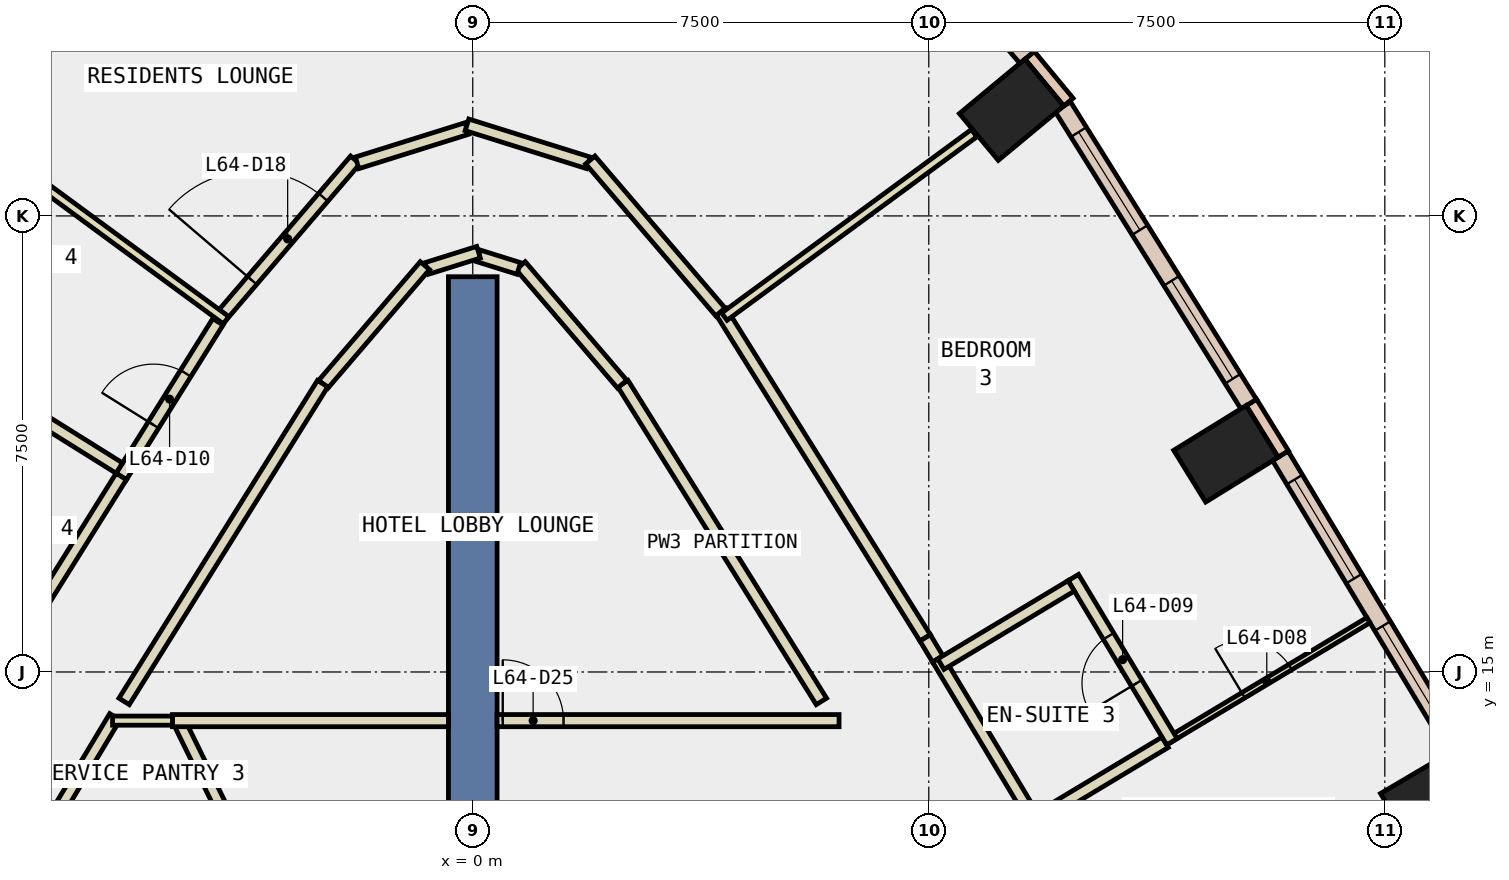
"""IFC4 building model, lengths in metres.
Left out: names, types, materials, properties, quantities, classifications, styles, units other than length and angle.
Written with IfcOpenShell. Run it as: python <this file> out.ifc"""

import sys

from ifc_helpers import new_model, si_unit, direction, frame, frame_2d, origin, origin_2d, place, context, subcontext, project, spatial, rectangle, extrude, element, fill, save


model = new_model("IFC4")
c1 = context("Model", 3, precision=1e-05, world=origin(), true_north=direction((0.0, 1.0)))
c2 = subcontext(c1, "Body", "Model", "MODEL_VIEW")
j1 = project(units=[si_unit("LENGTHUNIT", "METRE"), si_unit("PLANEANGLEUNIT", "RADIAN")], contexts=[c1])
p1 = place(None, origin())
s1 = spatial("IfcSite", under=j1, at=p1, CompositionType="ELEMENT")
p2 = place(p1, origin())
s2 = spatial("IfcBuilding", under=s1, at=p2, CompositionType="ELEMENT")
p3 = place(p2, frame((0.0, 0.0, 277.4)))
s3 = spatial("IfcBuildingStorey", under=s2, at=p3, CompositionType="ELEMENT", Elevation=277.4)
for number, where, z_axis, x_axis in (
    (1, (15.787, 12.927, -0.34), (0.0, 0.0, 1.0), (-0.509, 0.861, 0.0)),
    (2, (12.387, 18.588, -0.34), (0.0, 0.0, 1.0), (-0.526, 0.851, 0.0)),
    (3, (8.862, 24.246, -0.34), (0.0, 0.0, 1.0), (-0.639, 0.769, 0.0)),
):
    element("IfcColumn", number, at=place(p3, frame(where, z_axis=z_axis, x_axis=x_axis)), inside=s3, PredefinedType="COLUMN", context=c2, shape_type="SweptSolid", body=[
        extrude(rectangle(XDim=1.0, YDim=1.4, at=origin_2d()), origin(), (0.0, 0.0, 1.0), 3.34),
    ])
p4 = place(p3, frame((0.0, 12.5, -0.34), z_axis=(0.0, 0.0, 1.0), x_axis=(0.0, 1.0, 0.0)))
e4 = element("IfcWall", 4, at=p4, inside=s3, PredefinedType="SHEAR", context=c2, shape_type="SweptSolid", body=[
    extrude(rectangle(XDim=9.0, YDim=0.8, at=frame_2d((4.5, 0.0))), origin(), (0.0, 0.0, 1.0), 3.34),
])
p5 = place(p3, frame((13.331, 18.583, 0.0), z_axis=(0.0, 0.0, 1.0), x_axis=(-0.525825307325, 0.850592585306, 0.0)))
e5 = element("IfcWall", 5, at=p5, inside=s3, PredefinedType="STANDARD", context=c2, shape_type="SweptSolid", body=[
    extrude(rectangle(XDim=1.0, YDim=0.2, at=frame_2d((0.5, 0.0))), origin(), (0.0, 0.0, 1.0), 3.0),
])
p6 = place(p3, frame((9.796, 24.372, 0.0), z_axis=(0.0, 0.0, 1.0), x_axis=(-0.637972365578, 0.770059257953, 0.0)))
e6 = element("IfcWall", 6, at=p6, inside=s3, PredefinedType="STANDARD", context=c2, shape_type="SweptSolid", body=[
    extrude(rectangle(XDim=1.0, YDim=0.2, at=frame_2d((0.5, 0.0))), origin(), (0.0, 0.0, 1.0), 3.0),
])
p7 = place(p3, frame((16.176, 13.737, 0.0), z_axis=(0.0, 0.0, 1.0), x_axis=(-0.515006791362, 0.857186096977, 0.0)))
e7 = element("IfcWall", 7, at=p7, inside=s3, PredefinedType="STANDARD", context=c2, shape_type="SweptSolid", body=[
    extrude(rectangle(XDim=5.619, YDim=0.3, at=frame_2d((2.81, 0.0))), origin(), (0.0, 0.0, 1.0), 3.0),
])
p8 = place(p7, frame((0.455, 0.0, 0.9)))
e8 = element("IfcOpeningElement", 8, at=p8, cuts=e7, PredefinedType="OPENING", context=c2, shape_type="SweptSolid", body=[
    extrude(rectangle(XDim=1.9, YDim=2.0, at=frame_2d((0.95, 1.0))), frame((0.0, 0.16, 0.0), z_axis=(0.0, -1.0, 0.0), x_axis=(1.0, 0.0, 0.0)), (0.0, 0.0, 1.0), 0.32),
])
p9 = place(p7, frame((3.265, 0.0, 0.9)))
e9 = element("IfcOpeningElement", 9, at=p9, cuts=e7, PredefinedType="OPENING", context=c2, shape_type="SweptSolid", body=[
    extrude(rectangle(XDim=1.9, YDim=2.0, at=frame_2d((0.95, 1.0))), frame((0.0, 0.16, 0.0), z_axis=(0.0, -1.0, 0.0), x_axis=(1.0, 0.0, 0.0)), (0.0, 0.0, 1.0), 0.32),
])
p10 = place(p3, frame((12.761, 19.405, 0.0), z_axis=(0.0, 0.0, 1.0), x_axis=(-0.529915244244, 0.848050608111, 0.0)))
e10 = element("IfcWall", 10, at=p10, inside=s3, PredefinedType="STANDARD", context=c2, shape_type="SweptSolid", body=[
    extrude(rectangle(XDim=5.769, YDim=0.3, at=frame_2d((2.884, 0.0))), origin(), (0.0, 0.0, 1.0), 3.0),
])
p11 = place(p10, frame((0.492, 0.0, 0.9)))
e11 = element("IfcOpeningElement", 11, at=p11, cuts=e10, PredefinedType="OPENING", context=c2, shape_type="SweptSolid", body=[
    extrude(rectangle(XDim=1.9, YDim=2.0, at=frame_2d((0.95, 1.0))), frame((0.0, 0.16, 0.0), z_axis=(0.0, -1.0, 0.0), x_axis=(1.0, 0.0, 0.0)), (0.0, 0.0, 1.0), 0.32),
])
p12 = place(p10, frame((3.376, 0.0, 0.9)))
e12 = element("IfcOpeningElement", 12, at=p12, cuts=e10, PredefinedType="OPENING", context=c2, shape_type="SweptSolid", body=[
    extrude(rectangle(XDim=1.9, YDim=2.0, at=frame_2d((0.95, 1.0))), frame((0.0, 0.16, 0.0), z_axis=(0.0, -1.0, 0.0), x_axis=(1.0, 0.0, 0.0)), (0.0, 0.0, 1.0), 0.32),
])
p13 = place(p3, frame((9.114, 25.104, 0.0), z_axis=(0.0, 0.0, 1.0), x_axis=(-0.650534879197, 0.759476379454, 0.0)))
e13 = element("IfcWall", 13, at=p13, inside=s3, PredefinedType="STANDARD", context=c2, shape_type="SweptSolid", body=[
    extrude(rectangle(XDim=4.625, YDim=0.3, at=frame_2d((2.313, 0.0))), origin(), (0.0, 0.0, 1.0), 3.0),
])
p14 = place(p13, frame((1.613, 0.0, 0.9)))
e14 = element("IfcOpeningElement", 14, at=p14, cuts=e13, PredefinedType="OPENING", context=c2, shape_type="SweptSolid", body=[
    extrude(rectangle(XDim=1.4, YDim=2.0, at=frame_2d((0.7, 1.0))), frame((0.0, 0.16, 0.0), z_axis=(0.0, -1.0, 0.0), x_axis=(1.0, 0.0, 0.0)), (0.0, 0.0, 1.0), 0.32),
])
p15 = place(p3, frame((-6.105, 28.617, 0.0), z_axis=(0.0, 0.0, 1.0), x_axis=(-0.650534879197, -0.759476379454, 0.0)))
e15 = element("IfcWall", 15, at=p15, inside=s3, PredefinedType="STANDARD", context=c2, shape_type="SweptSolid", body=[
    extrude(rectangle(XDim=4.625, YDim=0.3, at=frame_2d((2.313, 0.0))), origin(), (0.0, 0.0, 1.0), 3.0),
])
p16 = place(p15, frame((1.613, 0.0, 0.9)))
e16 = element("IfcOpeningElement", 16, at=p16, cuts=e15, PredefinedType="OPENING", context=c2, shape_type="SweptSolid", body=[
    extrude(rectangle(XDim=1.4, YDim=2.0, at=frame_2d((0.7, 1.0))), frame((0.0, 0.16, 0.0), z_axis=(0.0, -1.0, 0.0), x_axis=(1.0, 0.0, 0.0)), (0.0, 0.0, 1.0), 0.32),
])
p17 = place(p3, frame((-4.005, 12.5, 0.0), z_axis=(0.0, 0.0, 1.0), x_axis=(-0.440355460167, 0.89782351757, 0.0)))
e17 = element("IfcWall", 17, at=p17, inside=s3, PredefinedType="PARTITIONING", context=c2, shape_type="SweptSolid", body=[
    extrude(rectangle(XDim=1.869, YDim=0.2, at=frame_2d((0.935, 0.0))), origin(), (0.0, 0.0, 1.0), 3.0),
])
p18 = place(p3, frame((-5.885, 14.264, 0.0), z_axis=(0.0, 0.0, 1.0), x_axis=(-0.514971458129, -0.857207324579, 0.0)))
e18 = element("IfcWall", 18, at=p18, inside=s3, PredefinedType="PARTITIONING", context=c2, shape_type="SweptSolid", body=[
    extrude(rectangle(XDim=4.83, YDim=0.2, at=frame_2d((2.415, 0.0))), origin(), (0.0, 0.0, 1.0), 3.0),
])
p19 = place(p18, frame((1.915, 0.0, 0.0)))
e19 = element("IfcOpeningElement", 19, at=p19, cuts=e18, PredefinedType="OPENING", context=c2, shape_type="SweptSolid", body=[
    extrude(rectangle(XDim=1.0, YDim=2.1, at=frame_2d((0.5, 1.05))), frame((0.0, 0.11, 0.0), z_axis=(0.0, -1.0, 0.0), x_axis=(1.0, 0.0, 0.0)), (0.0, 0.0, 1.0), 0.22),
])
p20 = place(p3, frame((-4.939, 14.2, 0.0), z_axis=(0.0, 0.0, 1.0), x_axis=(1.0, 0.0, 0.0)))
e20 = element("IfcWall", 20, at=p20, inside=s3, PredefinedType="PARTITIONING", context=c2, shape_type="SweptSolid", body=[
    extrude(rectangle(XDim=4.539, YDim=0.2, at=frame_2d((2.27, 0.0))), origin(), (0.0, 0.0, 1.0), 3.0),
])
p21 = place(p3, frame((5.734, 14.516, 0.0), z_axis=(0.0, 0.0, 1.0), x_axis=(-0.529852912827, 0.848089553508, 0.0)))
e21 = element("IfcWall", 21, at=p21, inside=s3, PredefinedType="PARTITIONING", context=c2, shape_type="SweptSolid", body=[
    extrude(rectangle(XDim=6.162, YDim=0.2, at=frame_2d((3.081, 0.0))), origin(), (0.0, 0.0, 1.0), 3.0),
])
p22 = place(p3, frame((2.457, 19.733, 0.0), z_axis=(0.0, 0.0, 1.0), x_axis=(-0.650650354416, 0.759377453114, 0.0)))
e22 = element("IfcWall", 22, at=p22, inside=s3, PredefinedType="PARTITIONING", context=c2, shape_type="SweptSolid", body=[
    extrude(rectangle(XDim=2.567, YDim=0.2, at=frame_2d((1.283, 0.0))), origin(), (0.0, 0.0, 1.0), 3.0),
])
p23 = place(p3, frame((0.757, 21.636, 0.0), z_axis=(0.0, 0.0, 1.0), x_axis=(-0.954429868001, 0.298435297959, 0.0)))
e23 = element("IfcWall", 23, at=p23, inside=s3, PredefinedType="PARTITIONING", context=c2, shape_type="SweptSolid", body=[
    extrude(rectangle(XDim=0.694, YDim=0.2, at=frame_2d((0.347, 0.0))), origin(), (0.0, 0.0, 1.0), 3.0),
])
p24 = place(p3, frame((0.095, 21.903, 0.0), z_axis=(0.0, 0.0, 1.0), x_axis=(-0.954216896292, -0.299115554311, 0.0)))
e24 = element("IfcWall", 24, at=p24, inside=s3, PredefinedType="PARTITIONING", context=c2, shape_type="SweptSolid", body=[
    extrude(rectangle(XDim=0.893, YDim=0.2, at=frame_2d((0.446, 0.0))), origin(), (0.0, 0.0, 1.0), 3.0),
])
p25 = place(p3, frame((-0.787, 21.682, 0.0), z_axis=(0.0, 0.0, 1.0), x_axis=(-0.650650354416, -0.759377453114, 0.0)))
e25 = element("IfcWall", 25, at=p25, inside=s3, PredefinedType="PARTITIONING", context=c2, shape_type="SweptSolid", body=[
    extrude(rectangle(XDim=2.567, YDim=0.2, at=frame_2d((1.283, 0.0))), origin(), (0.0, 0.0, 1.0), 3.0),
])
p26 = place(p3, frame((-2.469, 19.742, 0.0), z_axis=(0.0, 0.0, 1.0), x_axis=(-0.529852912827, -0.848089553508, 0.0)))
e26 = element("IfcWall", 26, at=p26, inside=s3, PredefinedType="PARTITIONING", context=c2, shape_type="SweptSolid", body=[
    extrude(rectangle(XDim=6.162, YDim=0.2, at=frame_2d((3.081, 0.0))), origin(), (0.0, 0.0, 1.0), 3.0),
])
p27 = place(p3, frame((4.085, 20.929, 0.0), z_axis=(0.0, 0.0, 1.0), x_axis=(0.530002406791, -0.847996137253, 0.0)))
e27 = element("IfcWall", 27, at=p27, inside=s3, PredefinedType="PARTITIONING", context=c2, shape_type="SweptSolid", body=[
    extrude(rectangle(XDim=6.33, YDim=0.2, at=frame_2d((3.165, 0.0))), origin(), (0.0, 0.0, 1.0), 3.0),
])
p28 = place(p3, frame((7.44, 15.561, 0.0), z_axis=(0.0, 0.0, 1.0), x_axis=(0.514229456049, -0.857652649114, 0.0)))
e28 = element("IfcWall", 28, at=p28, inside=s3, PredefinedType="PARTITIONING", context=c2, shape_type="SweptSolid", body=[
    extrude(rectangle(XDim=0.405, YDim=0.2, at=frame_2d((0.202, 0.0))), origin(), (0.0, 0.0, 1.0), 3.0),
])
p29 = place(p3, frame((7.648, 15.214, 0.0), z_axis=(0.0, 0.0, 1.0), x_axis=(0.515118014871, -0.857119262854, 0.0)))
e29 = element("IfcWall", 29, at=p29, inside=s3, PredefinedType="PARTITIONING", context=c2, shape_type="SweptSolid", body=[
    extrude(rectangle(XDim=3.0, YDim=0.2, at=frame_2d((1.5, 0.0))), origin(), (0.0, 0.0, 1.0), 3.0),
])
p30 = place(p3, frame((-4.155, 20.825, 0.0), z_axis=(0.0, 0.0, 1.0), x_axis=(0.650396970678, 0.75959448427, 0.0)))
e30 = element("IfcWall", 30, at=p30, inside=s3, PredefinedType="PARTITIONING", context=c2, shape_type="SweptSolid", body=[
    extrude(rectangle(XDim=3.416, YDim=0.2, at=frame_2d((1.708, 0.0))), origin(), (0.0, 0.0, 1.0), 3.0),
])
p31 = place(p30, frame((0.808, 0.0, 0.0)))
e31 = element("IfcOpeningElement", 31, at=p31, cuts=e30, PredefinedType="OPENING", context=c2, shape_type="SweptSolid", body=[
    extrude(rectangle(XDim=1.8, YDim=2.1, at=frame_2d((0.9, 1.05))), frame((0.0, 0.11, 0.0), z_axis=(0.0, -1.0, 0.0), x_axis=(1.0, 0.0, 0.0)), (0.0, 0.0, 1.0), 0.22),
])
p32 = place(p3, frame((-1.902, 23.373, 0.0), z_axis=(0.0, 0.0, 1.0), x_axis=(0.954447851072, 0.298377779976, 0.0)))
e32 = element("IfcWall", 32, at=p32, inside=s3, PredefinedType="PARTITIONING", context=c2, shape_type="SweptSolid", body=[
    extrude(rectangle(XDim=1.893, YDim=0.2, at=frame_2d((0.947, 0.0))), origin(), (0.0, 0.0, 1.0), 3.0),
])
p33 = place(p3, frame((-0.095, 23.998, 0.0), z_axis=(0.0, 0.0, 1.0), x_axis=(0.954355336779, -0.298673552831, 0.0)))
e33 = element("IfcWall", 33, at=p33, inside=s3, PredefinedType="PARTITIONING", context=c2, shape_type="SweptSolid", body=[
    extrude(rectangle(XDim=2.093, YDim=0.2, at=frame_2d((1.046, 0.0))), origin(), (0.0, 0.0, 1.0), 3.0),
])
p34 = place(p3, frame((1.933, 23.42, 0.0), z_axis=(0.0, 0.0, 1.0), x_axis=(0.65027189398, -0.759701562391, 0.0)))
e34 = element("IfcWall", 34, at=p34, inside=s3, PredefinedType="PARTITIONING", context=c2, shape_type="SweptSolid", body=[
    extrude(rectangle(XDim=3.291, YDim=0.2, at=frame_2d((1.646, 0.0))), origin(), (0.0, 0.0, 1.0), 3.0),
])
p35 = place(p3, frame((-5.781, 18.215, 0.0), z_axis=(0.0, 0.0, 1.0), x_axis=(0.530028199927, 0.847980015851, 0.0)))
e35 = element("IfcWall", 35, at=p35, inside=s3, PredefinedType="PARTITIONING", context=c2, shape_type="SweptSolid", body=[
    extrude(rectangle(XDim=3.0, YDim=0.2, at=frame_2d((1.5, 0.0))), origin(), (0.0, 0.0, 1.0), 3.0),
])
p36 = place(p35, frame((1.0, 0.0, 0.0)))
e36 = element("IfcOpeningElement", 36, at=p36, cuts=e35, PredefinedType="OPENING", context=c2, shape_type="SweptSolid", body=[
    extrude(rectangle(XDim=1.0, YDim=2.1, at=frame_2d((0.5, 1.05))), frame((0.0, 0.11, 0.0), z_axis=(0.0, -1.0, 0.0), x_axis=(1.0, 0.0, 0.0)), (0.0, 0.0, 1.0), 0.22),
])
p37 = place(p3, frame((-7.371, 15.671, 0.0), z_axis=(0.0, 0.0, 1.0), x_axis=(0.529991625428, 0.84800287557, 0.0)))
e37 = element("IfcWall", 37, at=p37, inside=s3, PredefinedType="PARTITIONING", context=c2, shape_type="SweptSolid", body=[
    extrude(rectangle(XDim=3.0, YDim=0.2, at=frame_2d((1.5, 0.0))), origin(), (0.0, 0.0, 1.0), 3.0),
])
p38 = place(p3, frame((-4.939, 14.2, 0.0), z_axis=(0.0, 0.0, 1.0), x_axis=(-1.0, 0.0, 0.0)))
e38 = element("IfcWall", 38, at=p38, inside=s3, PredefinedType="PARTITIONING", context=c2, shape_type="SweptSolid", body=[
    extrude(rectangle(XDim=0.985, YDim=0.15, at=frame_2d((0.493, 0.0))), origin(), (0.0, 0.0, 1.0), 3.0),
])
p39 = place(p3, frame((11.387, 13.844, 0.0), z_axis=(0.0, 0.0, 1.0), x_axis=(0.857238721908, 0.514919191389, 0.0)))
e39 = element("IfcWall", 39, at=p39, inside=s3, PredefinedType="PARTITIONING", context=c2, shape_type="SweptSolid", body=[
    extrude(rectangle(XDim=3.9, YDim=0.1, at=frame_2d((1.95, 0.0))), origin(), (0.0, 0.0, 1.0), 3.0),
])
p40 = place(p39, frame((1.5, 0.0, 0.0)))
e40 = element("IfcOpeningElement", 40, at=p40, cuts=e39, PredefinedType="OPENING", context=c2, shape_type="SweptSolid", body=[
    extrude(rectangle(XDim=0.9, YDim=2.1, at=frame_2d((0.45, 1.05))), frame((0.0, 0.06, 0.0), z_axis=(0.0, -1.0, 0.0), x_axis=(1.0, 0.0, 0.0)), (0.0, 0.0, 1.0), 0.12),
])
p41 = place(p3, frame((9.244, 12.557, 0.0), z_axis=(0.0, 0.0, 1.0), x_axis=(0.857268798444, 0.514869116586, 0.0)))
e41 = element("IfcWall", 41, at=p41, inside=s3, PredefinedType="PARTITIONING", context=c2, shape_type="SweptSolid", body=[
    extrude(rectangle(XDim=2.5, YDim=0.2, at=frame_2d((1.25, 0.0))), origin(), (0.0, 0.0, 1.0), 3.0),
])
p42 = place(p3, frame((11.499, 13.853, 0.0), z_axis=(0.0, 0.0, 1.0), x_axis=(-0.514985817066, 0.857198698214, 0.0)))
e42 = element("IfcWall", 42, at=p42, inside=s3, PredefinedType="PARTITIONING", context=c2, shape_type="SweptSolid", body=[
    extrude(rectangle(XDim=3.15, YDim=0.2, at=frame_2d((1.575, 0.0))), origin(), (0.0, 0.0, 1.0), 3.0),
])
p43 = place(p42, frame((1.125, 0.0, 0.0)))
e43 = element("IfcOpeningElement", 43, at=p43, cuts=e42, PredefinedType="OPENING", context=c2, shape_type="SweptSolid", body=[
    extrude(rectangle(XDim=0.9, YDim=2.1, at=frame_2d((0.45, 1.05))), frame((0.0, 0.11, 0.0), z_axis=(0.0, -1.0, 0.0), x_axis=(1.0, 0.0, 0.0)), (0.0, 0.0, 1.0), 0.22),
])
p44 = place(p3, frame((9.842, 16.416, 0.0), z_axis=(0.0, 0.0, 1.0), x_axis=(-0.857268798444, -0.514869116586, 0.0)))
e44 = element("IfcWall", 44, at=p44, inside=s3, PredefinedType="PARTITIONING", context=c2, shape_type="SweptSolid", body=[
    extrude(rectangle(XDim=2.5, YDim=0.2, at=frame_2d((1.25, 0.0))), origin(), (0.0, 0.0, 1.0), 3.0),
])
p45 = place(p3, frame((4.138, 20.844, 0.0), z_axis=(0.0, 0.0, 1.0), x_axis=(0.805989075855, 0.591930409426, 0.0)))
e45 = element("IfcWall", 45, at=p45, inside=s3, PredefinedType="PARTITIONING", context=c2, shape_type="SweptSolid", body=[
    extrude(rectangle(XDim=5.097, YDim=0.15, at=frame_2d((2.548, 0.0))), origin(), (0.0, 0.0, 1.0), 3.0),
])
p46 = place(p3, frame((-4.058, 20.785, 0.0), z_axis=(0.0, 0.0, 1.0), x_axis=(-0.805947688418, 0.591986759593, 0.0)))
e46 = element("IfcWall", 46, at=p46, inside=s3, PredefinedType="PARTITIONING", context=c2, shape_type="SweptSolid", body=[
    extrude(rectangle(XDim=5.196, YDim=0.15, at=frame_2d((2.598, 0.0))), origin(), (0.0, 0.0, 1.0), 3.0),
])
p47 = place(p3, frame((-5.813, 18.353, 0.0), z_axis=(0.0, 0.0, 1.0), x_axis=(-0.847969725239, 0.530044663287, 0.0)))
e47 = element("IfcWall", 47, at=p47, inside=s3, PredefinedType="PARTITIONING", context=c2, shape_type="SweptSolid", body=[
    extrude(rectangle(XDim=2.4, YDim=0.2, at=frame_2d((1.2, 0.0))), origin(), (0.0, 0.0, 1.0), 3.0),
])
p48 = place(p3, frame((0.4, 14.2, 0.0), z_axis=(0.0, 0.0, 1.0), x_axis=(1.0, 0.0, 0.0)))
e48 = element("IfcWall", 48, at=p48, inside=s3, PredefinedType="PARTITIONING", context=c2, shape_type="SweptSolid", body=[
    extrude(rectangle(XDim=5.624, YDim=0.2, at=frame_2d((2.812, 0.0))), origin(), (0.0, 0.0, 1.0), 3.0),
])
p49 = place(p48, frame((0.093, 0.0, 0.0)))
e49 = element("IfcOpeningElement", 49, at=p49, cuts=e48, PredefinedType="OPENING", context=c2, shape_type="SweptSolid", body=[
    extrude(rectangle(XDim=1.0, YDim=2.1, at=frame_2d((0.5, 1.05))), frame((0.0, 0.11, 0.0), z_axis=(0.0, -1.0, 0.0), x_axis=(1.0, 0.0, 0.0)), (0.0, 0.0, 1.0), 0.22),
])
p50 = place(p8, origin())
e50 = element("IfcWindow", 50, at=p50, inside=s3, PartitioningType="SINGLE_PANEL", PredefinedType="WINDOW", context=c2, shape_type="SweptSolid", body=[
    extrude(rectangle(XDim=1.9, YDim=2.0, at=frame_2d((0.95, 1.0))), frame((0.0, 0.03, 0.0), z_axis=(0.0, -1.0, 0.0), x_axis=(1.0, 0.0, 0.0)), (0.0, 0.0, 1.0), 0.06),
])
fill(e8, e50)
p51 = place(p9, origin())
e51 = element("IfcWindow", 51, at=p51, inside=s3, PartitioningType="SINGLE_PANEL", PredefinedType="WINDOW", context=c2, shape_type="SweptSolid", body=[
    extrude(rectangle(XDim=1.9, YDim=2.0, at=frame_2d((0.95, 1.0))), frame((0.0, 0.03, 0.0), z_axis=(0.0, -1.0, 0.0), x_axis=(1.0, 0.0, 0.0)), (0.0, 0.0, 1.0), 0.06),
])
fill(e9, e51)
p52 = place(p11, origin())
e52 = element("IfcWindow", 52, at=p52, inside=s3, PartitioningType="SINGLE_PANEL", PredefinedType="WINDOW", context=c2, shape_type="SweptSolid", body=[
    extrude(rectangle(XDim=1.9, YDim=2.0, at=frame_2d((0.95, 1.0))), frame((0.0, 0.03, 0.0), z_axis=(0.0, -1.0, 0.0), x_axis=(1.0, 0.0, 0.0)), (0.0, 0.0, 1.0), 0.06),
])
fill(e11, e52)
p53 = place(p12, origin())
e53 = element("IfcWindow", 53, at=p53, inside=s3, PartitioningType="SINGLE_PANEL", PredefinedType="WINDOW", context=c2, shape_type="SweptSolid", body=[
    extrude(rectangle(XDim=1.9, YDim=2.0, at=frame_2d((0.95, 1.0))), frame((0.0, 0.03, 0.0), z_axis=(0.0, -1.0, 0.0), x_axis=(1.0, 0.0, 0.0)), (0.0, 0.0, 1.0), 0.06),
])
fill(e12, e53)
p54 = place(p40, origin())
e54 = element("IfcDoor", 54, at=p54, inside=s3, OperationType="SINGLE_SWING_LEFT", PredefinedType="DOOR", context=c2, shape_type="SweptSolid", body=[
    extrude(rectangle(XDim=0.9, YDim=2.1, at=frame_2d((0.45, 1.05))), frame((0.0, 0.025, 0.0), z_axis=(0.0, -1.0, 0.0), x_axis=(1.0, 0.0, 0.0)), (0.0, 0.0, 1.0), 0.05),
])
fill(e40, e54)
p55 = place(p43, origin())
e55 = element("IfcDoor", 55, at=p55, inside=s3, OperationType="SINGLE_SWING_LEFT", PredefinedType="DOOR", context=c2, shape_type="SweptSolid", body=[
    extrude(rectangle(XDim=0.9, YDim=2.1, at=frame_2d((0.45, 1.05))), frame((0.0, 0.025, 0.0), z_axis=(0.0, -1.0, 0.0), x_axis=(1.0, 0.0, 0.0)), (0.0, 0.0, 1.0), 0.05),
])
fill(e43, e55)
p56 = place(p36, origin())
e56 = element("IfcDoor", 56, at=p56, inside=s3, OperationType="SINGLE_SWING_RIGHT", PredefinedType="DOOR", context=c2, shape_type="SweptSolid", body=[
    extrude(rectangle(XDim=1.0, YDim=2.1, at=frame_2d((0.5, 1.05))), frame((0.0, 0.025, 0.0), z_axis=(0.0, -1.0, 0.0), x_axis=(1.0, 0.0, 0.0)), (0.0, 0.0, 1.0), 0.05),
])
fill(e36, e56)
p57 = place(p31, origin())
e57 = element("IfcDoor", 57, at=p57, inside=s3, OperationType="DOUBLE_DOOR_SINGLE_SWING", PredefinedType="DOOR", context=c2, shape_type="SweptSolid", body=[
    extrude(rectangle(XDim=1.8, YDim=2.1, at=frame_2d((0.9, 1.05))), frame((0.0, 0.025, 0.0), z_axis=(0.0, -1.0, 0.0), x_axis=(1.0, 0.0, 0.0)), (0.0, 0.0, 1.0), 0.05),
])
fill(e31, e57)
p58 = place(p49, origin())
e58 = element("IfcDoor", 58, at=p58, inside=s3, OperationType="SINGLE_SWING_LEFT", PredefinedType="DOOR", context=c2, shape_type="SweptSolid", body=[
    extrude(rectangle(XDim=1.0, YDim=2.1, at=frame_2d((0.5, 1.05))), frame((0.0, 0.025, 0.0), z_axis=(0.0, -1.0, 0.0), x_axis=(1.0, 0.0, 0.0)), (0.0, 0.0, 1.0), 0.05),
])
fill(e49, e58)
save(model, sys.argv[1])
